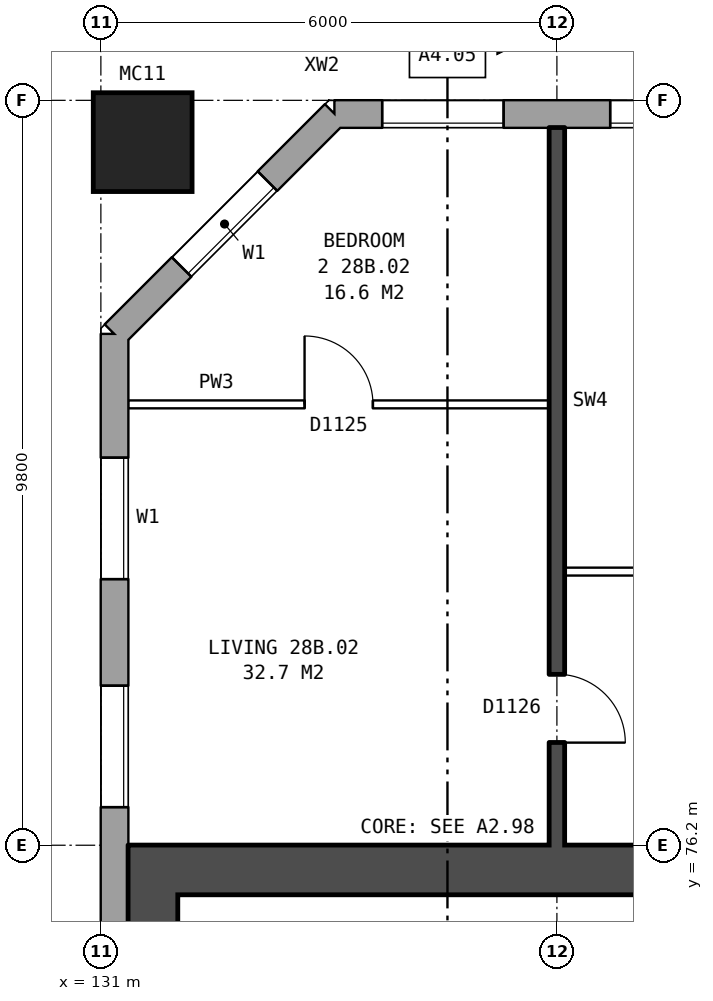
"""IFC4 building model, lengths in metres.
Left out: names, types, materials, properties, quantities, classifications, styles, units other than length and angle.
Written with IfcOpenShell. Run it as: python <this file> out.ifc"""

import sys

from ifc_helpers import new_model, si_unit, direction, frame, frame_2d, origin, origin_2d, place, context, subcontext, project, spatial, rectangle, hollow_rectangle, extrude, element, fill, save


model = new_model("IFC4")
c1 = context("Model", 3, precision=1e-05, world=origin(), true_north=direction((0.0, 1.0)))
c2 = subcontext(c1, "Body", "Model", "MODEL_VIEW")
j1 = project(units=[si_unit("LENGTHUNIT", "METRE"), si_unit("PLANEANGLEUNIT", "RADIAN")], contexts=[c1])
p1 = place(None, origin())
s1 = spatial("IfcSite", under=j1, at=p1, CompositionType="ELEMENT")
p2 = place(p1, origin())
s2 = spatial("IfcBuilding", under=s1, at=p2, CompositionType="ELEMENT")
p3 = place(p2, frame((0.0, 0.0, 102.6)))
s3 = spatial("IfcBuildingStorey", under=s2, at=p3, CompositionType="ELEMENT", Elevation=102.6)
p4 = place(p3, frame((131.55, 85.45, 0.0), z_axis=(0.0, 0.0, 1.0), x_axis=(1.0, 0.0, 0.0)))
e1 = element("IfcColumn", 1, at=p4, inside=s3, PredefinedType="COLUMN", context=c2, shape_type="SweptSolid", body=[
    extrude(hollow_rectangle(XDim=1.3, YDim=1.3, WallThickness=0.07, at=origin_2d()), origin(), (0.0, 0.0, 1.0), 3.1),
])
p5 = place(p3, frame((170.925, 85.82, 0.0), z_axis=(0.0, 0.0, 1.0), x_axis=(-1.0, 0.0, 0.0)))
e2 = element("IfcWall", 2, at=p5, inside=s3, PredefinedType="STANDARD", context=c2, shape_type="SweptSolid", body=[
    extrude(rectangle(XDim=36.851, YDim=0.36, at=frame_2d((18.425, 0.0))), origin(), (0.0, 0.0, 1.0), 2.85),
])
p6 = place(p5, frame((1.625, 0.0, 0.8)))
e3 = element("IfcOpeningElement", 3, at=p6, cuts=e2, PredefinedType="OPENING", context=c2, shape_type="SweptSolid", body=[
    extrude(rectangle(XDim=1.6, YDim=1.8, at=frame_2d((0.8, 0.9))), frame((0.0, 0.19, 0.0), z_axis=(0.0, -1.0, 0.0), x_axis=(1.0, 0.0, 0.0)), (0.0, 0.0, 1.0), 0.38),
])
p7 = place(p5, frame((4.125, 0.0, 0.8)))
e4 = element("IfcOpeningElement", 4, at=p7, cuts=e2, PredefinedType="OPENING", context=c2, shape_type="SweptSolid", body=[
    extrude(rectangle(XDim=0.8, YDim=1.8, at=frame_2d((0.4, 0.9))), frame((0.0, 0.19, 0.0), z_axis=(0.0, -1.0, 0.0), x_axis=(1.0, 0.0, 0.0)), (0.0, 0.0, 1.0), 0.38),
])
p8 = place(p5, frame((5.225, 0.0, 1.7)))
e5 = element("IfcOpeningElement", 5, at=p8, cuts=e2, PredefinedType="OPENING", context=c2, shape_type="SweptSolid", body=[
    extrude(rectangle(XDim=0.8, YDim=0.9, at=frame_2d((0.4, 0.45))), frame((0.0, 0.19, 0.0), z_axis=(0.0, -1.0, 0.0), x_axis=(1.0, 0.0, 0.0)), (0.0, 0.0, 1.0), 0.38),
])
p9 = place(p5, frame((10.625, 0.0, 0.8)))
e6 = element("IfcOpeningElement", 6, at=p9, cuts=e2, PredefinedType="OPENING", context=c2, shape_type="SweptSolid", body=[
    extrude(rectangle(XDim=1.6, YDim=1.8, at=frame_2d((0.8, 0.9))), frame((0.0, 0.19, 0.0), z_axis=(0.0, -1.0, 0.0), x_axis=(1.0, 0.0, 0.0)), (0.0, 0.0, 1.0), 0.38),
])
p10 = place(p5, frame((13.625, 0.0, 0.8)))
e7 = element("IfcOpeningElement", 7, at=p10, cuts=e2, PredefinedType="OPENING", context=c2, shape_type="SweptSolid", body=[
    extrude(rectangle(XDim=1.6, YDim=1.8, at=frame_2d((0.8, 0.9))), frame((0.0, 0.19, 0.0), z_axis=(0.0, -1.0, 0.0), x_axis=(1.0, 0.0, 0.0)), (0.0, 0.0, 1.0), 0.38),
])
p11 = place(p5, frame((16.625, 0.0, 0.8)))
e8 = element("IfcOpeningElement", 8, at=p11, cuts=e2, PredefinedType="OPENING", context=c2, shape_type="SweptSolid", body=[
    extrude(rectangle(XDim=1.6, YDim=1.8, at=frame_2d((0.8, 0.9))), frame((0.0, 0.19, 0.0), z_axis=(0.0, -1.0, 0.0), x_axis=(1.0, 0.0, 0.0)), (0.0, 0.0, 1.0), 0.38),
])
p12 = place(p5, frame((19.625, 0.0, 0.8)))
e9 = element("IfcOpeningElement", 9, at=p12, cuts=e2, PredefinedType="OPENING", context=c2, shape_type="SweptSolid", body=[
    extrude(rectangle(XDim=1.6, YDim=1.8, at=frame_2d((0.8, 0.9))), frame((0.0, 0.19, 0.0), z_axis=(0.0, -1.0, 0.0), x_axis=(1.0, 0.0, 0.0)), (0.0, 0.0, 1.0), 0.38),
])
p13 = place(p5, frame((22.625, 0.0, 0.8)))
e10 = element("IfcOpeningElement", 10, at=p13, cuts=e2, PredefinedType="OPENING", context=c2, shape_type="SweptSolid", body=[
    extrude(rectangle(XDim=1.6, YDim=1.8, at=frame_2d((0.8, 0.9))), frame((0.0, 0.19, 0.0), z_axis=(0.0, -1.0, 0.0), x_axis=(1.0, 0.0, 0.0)), (0.0, 0.0, 1.0), 0.38),
])
p14 = place(p5, frame((25.625, 0.0, 0.8)))
e11 = element("IfcOpeningElement", 11, at=p14, cuts=e2, PredefinedType="OPENING", context=c2, shape_type="SweptSolid", body=[
    extrude(rectangle(XDim=1.6, YDim=1.8, at=frame_2d((0.8, 0.9))), frame((0.0, 0.19, 0.0), z_axis=(0.0, -1.0, 0.0), x_axis=(1.0, 0.0, 0.0)), (0.0, 0.0, 1.0), 0.38),
])
p15 = place(p5, frame((28.125, 0.0, 0.8)))
e12 = element("IfcOpeningElement", 12, at=p15, cuts=e2, PredefinedType="OPENING", context=c2, shape_type="SweptSolid", body=[
    extrude(rectangle(XDim=1.2, YDim=1.2, at=frame_2d((0.6, 0.6))), frame((0.0, 0.19, 0.0), z_axis=(0.0, -1.0, 0.0), x_axis=(1.0, 0.0, 0.0)), (0.0, 0.0, 1.0), 0.38),
])
p16 = place(p5, frame((31.625, 0.0, 0.8)))
e13 = element("IfcOpeningElement", 13, at=p16, cuts=e2, PredefinedType="OPENING", context=c2, shape_type="SweptSolid", body=[
    extrude(rectangle(XDim=1.6, YDim=1.8, at=frame_2d((0.8, 0.9))), frame((0.0, 0.19, 0.0), z_axis=(0.0, -1.0, 0.0), x_axis=(1.0, 0.0, 0.0)), (0.0, 0.0, 1.0), 0.38),
])
p17 = place(p5, frame((34.625, 0.0, 0.8)))
e14 = element("IfcOpeningElement", 14, at=p17, cuts=e2, PredefinedType="OPENING", context=c2, shape_type="SweptSolid", body=[
    extrude(rectangle(XDim=1.6, YDim=1.8, at=frame_2d((0.8, 0.9))), frame((0.0, 0.19, 0.0), z_axis=(0.0, -1.0, 0.0), x_axis=(1.0, 0.0, 0.0)), (0.0, 0.0, 1.0), 0.38),
])
p18 = place(p5, frame((7.125, 0.0, 0.8)))
e15 = element("IfcOpeningElement", 15, at=p18, cuts=e2, PredefinedType="OPENING", context=c2, shape_type="SweptSolid", body=[
    extrude(rectangle(XDim=0.8, YDim=0.9, at=frame_2d((0.4, 0.45))), frame((0.0, 0.19, 0.0), z_axis=(0.0, -1.0, 0.0), x_axis=(1.0, 0.0, 0.0)), (0.0, 0.0, 1.0), 0.38),
])
p19 = place(p5, frame((8.225, 0.0, 0.8)))
e16 = element("IfcOpeningElement", 16, at=p19, cuts=e2, PredefinedType="OPENING", context=c2, shape_type="SweptSolid", body=[
    extrude(rectangle(XDim=1.4, YDim=1.8, at=frame_2d((0.7, 0.9))), frame((0.0, 0.19, 0.0), z_axis=(0.0, -1.0, 0.0), x_axis=(1.0, 0.0, 0.0)), (0.0, 0.0, 1.0), 0.38),
])
p20 = place(p3, frame((134.075, 85.82, 0.0), z_axis=(0.0, 0.0, 1.0), x_axis=(-0.707106781187, -0.707106781187, 0.0)))
e17 = element("IfcWall", 17, at=p20, inside=s3, PredefinedType="STANDARD", context=c2, shape_type="SweptSolid", body=[
    extrude(rectangle(XDim=4.094, YDim=0.36, at=frame_2d((2.047, 0.0))), origin(), (0.0, 0.0, 1.0), 2.85),
])
p21 = place(p20, frame((1.247, 0.0, 0.8)))
e18 = element("IfcOpeningElement", 18, at=p21, cuts=e17, PredefinedType="OPENING", context=c2, shape_type="SweptSolid", body=[
    extrude(rectangle(XDim=1.6, YDim=1.8, at=frame_2d((0.8, 0.9))), frame((0.0, 0.19, 0.0), z_axis=(0.0, -1.0, 0.0), x_axis=(1.0, 0.0, 0.0)), (0.0, 0.0, 1.0), 0.38),
])
p22 = place(p3, frame((131.18, 82.925, 0.0), z_axis=(0.0, 0.0, 1.0), x_axis=(0.0, -1.0, 0.0)))
e19 = element("IfcWall", 19, at=p22, inside=s3, PredefinedType="STANDARD", context=c2, shape_type="SweptSolid", body=[
    extrude(rectangle(XDim=25.851, YDim=0.36, at=frame_2d((12.925, 0.0))), origin(), (0.0, 0.0, 1.0), 2.85),
])
p23 = place(p22, frame((1.625, 0.0, 0.8)))
e20 = element("IfcOpeningElement", 20, at=p23, cuts=e19, PredefinedType="OPENING", context=c2, shape_type="SweptSolid", body=[
    extrude(rectangle(XDim=1.6, YDim=1.8, at=frame_2d((0.8, 0.9))), frame((0.0, 0.19, 0.0), z_axis=(0.0, -1.0, 0.0), x_axis=(1.0, 0.0, 0.0)), (0.0, 0.0, 1.0), 0.38),
])
p24 = place(p22, frame((4.625, 0.0, 0.8)))
e21 = element("IfcOpeningElement", 21, at=p24, cuts=e19, PredefinedType="OPENING", context=c2, shape_type="SweptSolid", body=[
    extrude(rectangle(XDim=1.6, YDim=1.8, at=frame_2d((0.8, 0.9))), frame((0.0, 0.19, 0.0), z_axis=(0.0, -1.0, 0.0), x_axis=(1.0, 0.0, 0.0)), (0.0, 0.0, 1.0), 0.38),
])
p25 = place(p22, frame((19.625, 0.0, 0.8)))
e22 = element("IfcOpeningElement", 22, at=p25, cuts=e19, PredefinedType="OPENING", context=c2, shape_type="SweptSolid", body=[
    extrude(rectangle(XDim=1.6, YDim=1.8, at=frame_2d((0.8, 0.9))), frame((0.0, 0.19, 0.0), z_axis=(0.0, -1.0, 0.0), x_axis=(1.0, 0.0, 0.0)), (0.0, 0.0, 1.0), 0.38),
])
p26 = place(p22, frame((22.625, 0.0, 0.8)))
e23 = element("IfcOpeningElement", 23, at=p26, cuts=e19, PredefinedType="OPENING", context=c2, shape_type="SweptSolid", body=[
    extrude(rectangle(XDim=1.6, YDim=1.8, at=frame_2d((0.8, 0.9))), frame((0.0, 0.19, 0.0), z_axis=(0.0, -1.0, 0.0), x_axis=(1.0, 0.0, 0.0)), (0.0, 0.0, 1.0), 0.38),
])
p27 = place(p3, frame((131.685, 64.45, 0.0), z_axis=(0.0, 0.0, 1.0), x_axis=(0.0, 1.0, 0.0)))
e24 = element("IfcWall", 24, at=p27, inside=s3, PredefinedType="SHEAR", context=c2, shape_type="SweptSolid", body=[
    extrude(rectangle(XDim=11.1, YDim=0.65, at=frame_2d((5.55, 0.0))), origin(), (0.0, 0.0, 1.0), 2.85),
])
p28 = place(p3, frame((139.76, 75.875, 0.0), z_axis=(0.0, 0.0, 1.0), x_axis=(-1.0, 0.0, 0.0)))
e25 = element("IfcWall", 25, at=p28, inside=s3, PredefinedType="SHEAR", context=c2, shape_type="SweptSolid", body=[
    extrude(rectangle(XDim=8.4, YDim=0.65, at=frame_2d((4.2, 0.0))), origin(), (0.0, 0.0, 1.0), 2.85),
])
p29 = place(p3, frame((137.1, 79.8, 0.0), z_axis=(0.0, 0.0, 1.0), x_axis=(1.0, 0.0, 0.0)))
e26 = element("IfcWall", 26, at=p29, inside=s3, PredefinedType="PARTITIONING", context=c2, shape_type="SweptSolid", body=[
    extrude(rectangle(XDim=5.8, YDim=0.1, at=frame_2d((2.9, 0.0))), origin(), (0.0, 0.0, 1.0), 2.85),
])
p30 = place(p29, frame((1.3, 0.0, 0.0)))
e27 = element("IfcOpeningElement", 27, at=p30, cuts=e26, PredefinedType="OPENING", context=c2, shape_type="SweptSolid", body=[
    extrude(rectangle(XDim=0.9, YDim=2.1, at=frame_2d((0.45, 1.05))), frame((0.0, 0.06, 0.0), z_axis=(0.0, -1.0, 0.0), x_axis=(1.0, 0.0, 0.0)), (0.0, 0.0, 1.0), 0.12),
])
p31 = place(p29, frame((4.2, 0.0, 0.0)))
e28 = element("IfcOpeningElement", 28, at=p31, cuts=e26, PredefinedType="OPENING", context=c2, shape_type="SweptSolid", body=[
    extrude(rectangle(XDim=0.9, YDim=2.1, at=frame_2d((0.45, 1.05))), frame((0.0, 0.06, 0.0), z_axis=(0.0, -1.0, 0.0), x_axis=(1.0, 0.0, 0.0)), (0.0, 0.0, 1.0), 0.12),
])
p32 = place(p3, frame((131.36, 82.0, 0.0), z_axis=(0.0, 0.0, 1.0), x_axis=(1.0, 0.0, 0.0)))
e29 = element("IfcWall", 29, at=p32, inside=s3, PredefinedType="PARTITIONING", context=c2, shape_type="SweptSolid", body=[
    extrude(rectangle(XDim=5.54, YDim=0.1, at=frame_2d((2.77, 0.0))), origin(), (0.0, 0.0, 1.0), 2.85),
])
p33 = place(p32, frame((2.32, 0.0, 0.0)))
e30 = element("IfcOpeningElement", 30, at=p33, cuts=e29, PredefinedType="OPENING", context=c2, shape_type="SweptSolid", body=[
    extrude(rectangle(XDim=0.9, YDim=2.1, at=frame_2d((0.45, 1.05))), frame((0.0, 0.06, 0.0), z_axis=(0.0, -1.0, 0.0), x_axis=(1.0, 0.0, 0.0)), (0.0, 0.0, 1.0), 0.12),
])
p34 = place(p3, frame((137.0, 76.2, 0.0), z_axis=(0.0, 0.0, 1.0), x_axis=(0.0, 1.0, 0.0)))
e31 = element("IfcWall", 31, at=p34, inside=s3, PredefinedType="SOLIDWALL", context=c2, shape_type="SweptSolid", body=[
    extrude(rectangle(XDim=9.44, YDim=0.2, at=frame_2d((4.72, 0.0))), origin(), (0.0, 0.0, 1.0), 2.85),
])
p35 = place(p34, frame((1.35, 0.0, 0.0)))
e32 = element("IfcOpeningElement", 32, at=p35, cuts=e31, PredefinedType="OPENING", context=c2, shape_type="SweptSolid", body=[
    extrude(rectangle(XDim=0.9, YDim=2.1, at=frame_2d((0.45, 1.05))), frame((0.0, 0.11, 0.0), z_axis=(0.0, -1.0, 0.0), x_axis=(1.0, 0.0, 0.0)), (0.0, 0.0, 1.0), 0.22),
])
p36 = place(p16, origin())
e33 = element("IfcWindow", 33, at=p36, inside=s3, PartitioningType="SINGLE_PANEL", PredefinedType="WINDOW", context=c2, shape_type="SweptSolid", body=[
    extrude(rectangle(XDim=1.6, YDim=1.8, at=frame_2d((0.8, 0.9))), frame((0.0, 0.15, 0.0), z_axis=(0.0, -1.0, 0.0), x_axis=(1.0, 0.0, 0.0)), (0.0, 0.0, 1.0), 0.06),
])
fill(e13, e33)
p37 = place(p17, origin())
e34 = element("IfcWindow", 34, at=p37, inside=s3, PartitioningType="SINGLE_PANEL", PredefinedType="WINDOW", context=c2, shape_type="SweptSolid", body=[
    extrude(rectangle(XDim=1.6, YDim=1.8, at=frame_2d((0.8, 0.9))), frame((0.0, 0.15, 0.0), z_axis=(0.0, -1.0, 0.0), x_axis=(1.0, 0.0, 0.0)), (0.0, 0.0, 1.0), 0.06),
])
fill(e14, e34)
p38 = place(p21, origin())
e35 = element("IfcWindow", 35, at=p38, inside=s3, PartitioningType="SINGLE_PANEL", PredefinedType="WINDOW", context=c2, shape_type="SweptSolid", body=[
    extrude(rectangle(XDim=1.6, YDim=1.8, at=frame_2d((0.8, 0.9))), frame((0.0, 0.15, 0.0), z_axis=(0.0, -1.0, 0.0), x_axis=(1.0, 0.0, 0.0)), (0.0, 0.0, 1.0), 0.06),
])
fill(e18, e35)
p39 = place(p23, origin())
e36 = element("IfcWindow", 36, at=p39, inside=s3, PartitioningType="SINGLE_PANEL", PredefinedType="WINDOW", context=c2, shape_type="SweptSolid", body=[
    extrude(rectangle(XDim=1.6, YDim=1.8, at=frame_2d((0.8, 0.9))), frame((0.0, 0.15, 0.0), z_axis=(0.0, -1.0, 0.0), x_axis=(1.0, 0.0, 0.0)), (0.0, 0.0, 1.0), 0.06),
])
fill(e20, e36)
p40 = place(p24, origin())
e37 = element("IfcWindow", 37, at=p40, inside=s3, PartitioningType="SINGLE_PANEL", PredefinedType="WINDOW", context=c2, shape_type="SweptSolid", body=[
    extrude(rectangle(XDim=1.6, YDim=1.8, at=frame_2d((0.8, 0.9))), frame((0.0, 0.15, 0.0), z_axis=(0.0, -1.0, 0.0), x_axis=(1.0, 0.0, 0.0)), (0.0, 0.0, 1.0), 0.06),
])
fill(e21, e37)
p41 = place(p33, origin())
e38 = element("IfcDoor", 38, at=p41, inside=s3, OperationType="SINGLE_SWING_LEFT", PredefinedType="DOOR", context=c2, shape_type="SweptSolid", body=[
    extrude(rectangle(XDim=0.9, YDim=2.1, at=frame_2d((0.45, 1.05))), frame((0.0, 0.025, 0.0), z_axis=(0.0, -1.0, 0.0), x_axis=(1.0, 0.0, 0.0)), (0.0, 0.0, 1.0), 0.05),
])
fill(e30, e38)
p42 = place(p35, frame((0.9, 0.0, 0.0), z_axis=(0.0, 0.0, 1.0), x_axis=(-1.0, 0.0, 0.0)))
e39 = element("IfcDoor", 39, at=p42, inside=s3, OperationType="SINGLE_SWING_RIGHT", PredefinedType="DOOR", context=c2, shape_type="SweptSolid", body=[
    extrude(rectangle(XDim=0.9, YDim=2.1, at=frame_2d((0.45, 1.05))), frame((0.0, 0.025, 0.0), z_axis=(0.0, -1.0, 0.0), x_axis=(1.0, 0.0, 0.0)), (0.0, 0.0, 1.0), 0.05),
])
fill(e32, e39)
save(model, sys.argv[1])
